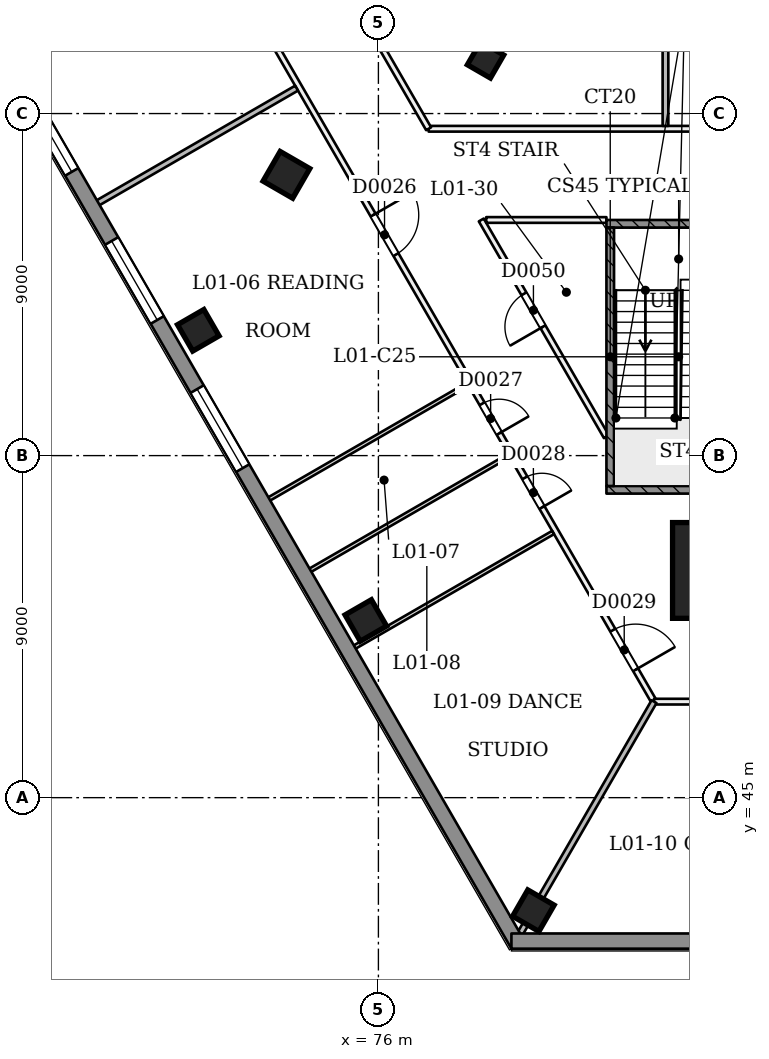
"""IFC4 building model, lengths in metres.
Left out: names, types, materials, properties, quantities, classifications, styles, units other than length and angle.
Written with IfcOpenShell. Run it as: python <this file> out.ifc"""

import sys

from ifc_helpers import new_model, si_unit, direction, frame, frame_2d, origin, origin_2d, place, context, subcontext, project, spatial, rectangle, extrude, element, fill, save


model = new_model("IFC4")
c1 = context("Model", 3, precision=1e-05, world=origin(), true_north=direction((0.0, 1.0)))
c2 = subcontext(c1, "Body", "Model", "MODEL_VIEW")
j1 = project(units=[si_unit("LENGTHUNIT", "METRE"), si_unit("PLANEANGLEUNIT", "RADIAN")], contexts=[c1])
p1 = place(None, origin())
s1 = spatial("IfcSite", under=j1, at=p1, CompositionType="ELEMENT")
p2 = place(p1, origin())
s2 = spatial("IfcBuilding", under=s1, at=p2, CompositionType="ELEMENT")
p3 = place(p2, frame((0.0, 0.0, 9.0)))
s3 = spatial("IfcBuildingStorey", under=s2, at=p3, CompositionType="ELEMENT", Elevation=9.0)
p4 = place(p3, frame((78.792, 64.365, -0.021), z_axis=(0.02216777731, 0.038481960612, 0.999013377466), x_axis=(-0.865113540396, -0.500099350468, 0.03846039371)))
e1 = element("IfcColumn", 1, at=p4, inside=s3, PredefinedType="COLUMN", context=c2, shape_type="SweptSolid", body=[
    extrude(rectangle(XDim=0.7, YDim=0.7, at=origin_2d()), origin(), (0.0, 0.0, 1.0), 4.504),
])
p5 = place(p3, frame((85.0, 50.908, 0.0), z_axis=(0.0, 0.058331497301, 0.998297268564), x_axis=(-1.0, 0.0, 0.0)))
e2 = element("IfcColumn", 2, at=p5, inside=s3, PredefinedType="COLUMN", context=c2, shape_type="SweptSolid", body=[
    extrude(rectangle(XDim=2.52, YDim=2.52, at=origin_2d()), origin(), (0.0, 0.0, 1.0), 4.508),
])
p6 = place(p3, frame((73.553, 61.34, -0.027), z_axis=(0.022167823514, 0.038427840761, 0.999015459668), x_axis=(-0.865419259621, -0.49957324129, 0.038419808228)))
e3 = element("IfcColumn", 3, at=p6, inside=s3, PredefinedType="COLUMN", context=c2, shape_type="SweptSolid", body=[
    extrude(rectangle(XDim=0.9, YDim=0.9, at=origin_2d()), origin(), (0.0, 0.0, 1.0), 4.504),
])
for number, where, z_axis, x_axis in (
    (4, (71.261, 57.297, 0.0), (0.0, 0.0, 1.0), (0.866, 0.5, 0.0)),
    (5, (75.669, 49.662, 0.0), (0.0, 0.0, 1.0), (0.866, 0.5, 0.0)),
    (6, (80.077, 42.026, 0.0), (0.0, 0.0, 1.0), (0.5, 0.866, 0.0)),
):
    element("IfcColumn", number, at=place(p3, frame(where, z_axis=z_axis, x_axis=x_axis)), inside=s3, PredefinedType="COLUMN", context=c2, shape_type="SweptSolid", body=[
        extrude(rectangle(XDim=0.8, YDim=0.8, at=origin_2d()), origin(), (0.0, 0.0, 1.0), 4.5),
    ])
p7 = place(p3, frame((55.57, 95.474, 0.0), z_axis=(0.0, 0.0, 1.0), x_axis=(0.500000085768, -0.866025354266, 0.0)))
e7 = element("IfcWall", 7, at=p7, inside=s3, PredefinedType="PARTITIONING", context=c2, shape_type="SweptSolid", body=[
    extrude(rectangle(XDim=55.365, YDim=0.15, at=frame_2d((27.682, 0.0))), origin(), (0.0, 0.0, 1.0), 4.05),
])
p8 = place(p7, frame((6.832, 0.0, 0.0)))
e8 = element("IfcOpeningElement", 8, at=p8, cuts=e7, PredefinedType="OPENING", context=c2, shape_type="SweptSolid", body=[
    extrude(rectangle(XDim=1.2, YDim=2.1, at=frame_2d((0.6, 1.05))), frame((0.0, 0.085, 0.0), z_axis=(0.0, -1.0, 0.0), x_axis=(1.0, 0.0, 0.0)), (0.0, 0.0, 1.0), 0.171),
])
p9 = place(p7, frame((18.182, 0.0, 0.0)))
e9 = element("IfcOpeningElement", 9, at=p9, cuts=e7, PredefinedType="OPENING", context=c2, shape_type="SweptSolid", body=[
    extrude(rectangle(XDim=1.0, YDim=2.1, at=frame_2d((0.5, 1.05))), frame((0.0, 0.085, 0.0), z_axis=(0.0, -1.0, 0.0), x_axis=(1.0, 0.0, 0.0)), (0.0, 0.0, 1.0), 0.171),
])
p10 = place(p7, frame((30.132, 0.0, 0.0)))
e10 = element("IfcOpeningElement", 10, at=p10, cuts=e7, PredefinedType="OPENING", context=c2, shape_type="SweptSolid", body=[
    extrude(rectangle(XDim=1.2, YDim=2.1, at=frame_2d((0.6, 1.05))), frame((0.0, 0.085, 0.0), z_axis=(0.0, -1.0, 0.0), x_axis=(1.0, 0.0, 0.0)), (0.0, 0.0, 1.0), 0.171),
])
p11 = place(p7, frame((40.582, 0.0, 0.0)))
e11 = element("IfcOpeningElement", 11, at=p11, cuts=e7, PredefinedType="OPENING", context=c2, shape_type="SweptSolid", body=[
    extrude(rectangle(XDim=1.2, YDim=2.1, at=frame_2d((0.6, 1.05))), frame((0.0, 0.085, 0.0), z_axis=(0.0, -1.0, 0.0), x_axis=(1.0, 0.0, 0.0)), (0.0, 0.0, 1.0), 0.171),
])
p12 = place(p7, frame((46.315, 0.0, 0.0)))
e12 = element("IfcOpeningElement", 12, at=p12, cuts=e7, PredefinedType="OPENING", context=c2, shape_type="SweptSolid", body=[
    extrude(rectangle(XDim=0.9, YDim=2.1, at=frame_2d((0.45, 1.05))), frame((0.0, 0.085, 0.0), z_axis=(0.0, -1.0, 0.0), x_axis=(1.0, 0.0, 0.0)), (0.0, 0.0, 1.0), 0.171),
])
p13 = place(p7, frame((48.565, 0.0, 0.0)))
e13 = element("IfcOpeningElement", 13, at=p13, cuts=e7, PredefinedType="OPENING", context=c2, shape_type="SweptSolid", body=[
    extrude(rectangle(XDim=0.9, YDim=2.1, at=frame_2d((0.45, 1.05))), frame((0.0, 0.085, 0.0), z_axis=(0.0, -1.0, 0.0), x_axis=(1.0, 0.0, 0.0)), (0.0, 0.0, 1.0), 0.171),
])
p14 = place(p7, frame((53.195, 0.0, 0.0)))
e14 = element("IfcOpeningElement", 14, at=p14, cuts=e7, PredefinedType="OPENING", context=c2, shape_type="SweptSolid", body=[
    extrude(rectangle(XDim=1.2, YDim=2.1, at=frame_2d((0.6, 1.05))), frame((0.0, 0.085, 0.0), z_axis=(0.0, -1.0, 0.0), x_axis=(1.0, 0.0, 0.0)), (0.0, 0.0, 1.0), 0.171),
])
p15 = place(p3, frame((83.253, 47.526, 0.0), z_axis=(0.0, 0.0, 1.0), x_axis=(1.0, 0.0, 0.0)))
e15 = element("IfcWall", 15, at=p15, inside=s3, PredefinedType="PARTITIONING", context=c2, shape_type="SweptSolid", body=[
    extrude(rectangle(XDim=3.495, YDim=0.15, at=frame_2d((1.747, 0.0))), origin(), (0.0, 0.0, 1.0), 4.05),
])
p16 = place(p15, frame((1.147, 0.0, 0.0)))
e16 = element("IfcOpeningElement", 16, at=p16, cuts=e15, PredefinedType="OPENING", context=c2, shape_type="SweptSolid", body=[
    extrude(rectangle(XDim=1.2, YDim=2.1, at=frame_2d((0.6, 1.05))), frame((0.0, 0.085, 0.0), z_axis=(0.0, -1.0, 0.0), x_axis=(1.0, 0.0, 0.0)), (0.0, 0.0, 1.0), 0.171),
])
p17 = place(p3, frame((92.679, 62.6, 0.0), z_axis=(0.0, 0.0, 1.0), x_axis=(-1.0, 0.0, 0.0)))
e17 = element("IfcWall", 17, at=p17, inside=s3, PredefinedType="PARTITIONING", context=c2, shape_type="SweptSolid", body=[
    extrude(rectangle(XDim=15.357, YDim=0.15, at=frame_2d((7.679, 0.0))), origin(), (0.0, 0.0, 1.0), 4.05),
])
p18 = place(p3, frame((77.321, 62.6, 0.0), z_axis=(0.0, 0.0, 1.0), x_axis=(-0.500000743568, 0.866024974485, 0.0)))
e18 = element("IfcWall", 18, at=p18, inside=s3, PredefinedType="PARTITIONING", context=c2, shape_type="SweptSolid", body=[
    extrude(rectangle(XDim=31.87, YDim=0.15, at=frame_2d((15.935, 0.0))), origin(), (0.0, 0.0, 1.0), 4.05),
])
p19 = place(p18, frame((19.989, 0.0, 0.0)))
e19 = element("IfcOpeningElement", 19, at=p19, cuts=e18, PredefinedType="OPENING", context=c2, shape_type="SweptSolid", body=[
    extrude(rectangle(XDim=1.2, YDim=2.1, at=frame_2d((0.6, 1.05))), frame((0.0, 0.085, 0.0), z_axis=(0.0, -1.0, 0.0), x_axis=(1.0, 0.0, 0.0)), (0.0, 0.0, 1.0), 0.171),
])
p20 = place(p18, frame((5.035, 0.0, 0.0)))
e20 = element("IfcOpeningElement", 20, at=p20, cuts=e18, PredefinedType="OPENING", context=c2, shape_type="SweptSolid", body=[
    extrude(rectangle(XDim=1.2, YDim=2.1, at=frame_2d((0.6, 1.05))), frame((0.0, 0.085, 0.0), z_axis=(0.0, -1.0, 0.0), x_axis=(1.0, 0.0, 0.0)), (0.0, 0.0, 1.0), 0.171),
])
p21 = place(p3, frame((82.0, 54.496, 0.0), z_axis=(0.0, 0.0, 1.0), x_axis=(-0.500010165703, 0.866019534533, 0.0)))
e21 = element("IfcWall", 21, at=p21, inside=s3, PredefinedType="PARTITIONING", context=c2, shape_type="SweptSolid", body=[
    extrude(rectangle(XDim=6.586, YDim=0.15, at=frame_2d((3.293, 0.0))), origin(), (0.0, 0.0, 1.0), 4.05),
])
p22 = place(p21, frame((3.342, 0.0, 0.0)))
e22 = element("IfcOpeningElement", 22, at=p22, cuts=e21, PredefinedType="OPENING", context=c2, shape_type="SweptSolid", body=[
    extrude(rectangle(XDim=1.0, YDim=2.1, at=frame_2d((0.5, 1.05))), frame((0.0, 0.085, 0.0), z_axis=(0.0, -1.0, 0.0), x_axis=(1.0, 0.0, 0.0)), (0.0, 0.0, 1.0), 0.171),
])
p23 = place(p3, frame((78.837, 60.2, 0.0), z_axis=(0.0, 0.0, 1.0), x_axis=(0.999999952341, -0.00030873725, 0.0)))
e23 = element("IfcWall", 23, at=p23, inside=s3, PredefinedType="PARTITIONING", context=c2, shape_type="SweptSolid", body=[
    extrude(rectangle(XDim=3.163, YDim=0.15, at=frame_2d((1.582, 0.0))), origin(), (0.0, 0.0, 1.0), 4.05),
])
p24 = place(p3, frame((68.369, 60.506, 0.0), z_axis=(0.0, 0.0, 1.0), x_axis=(0.866042250622, 0.499970819286, 0.0)))
e24 = element("IfcWall", 24, at=p24, inside=s3, PredefinedType="PARTITIONING", context=c2, shape_type="SweptSolid", body=[
    extrude(rectangle(XDim=6.325, YDim=0.15, at=frame_2d((3.163, 0.0))), origin(), (0.0, 0.0, 1.0), 4.05),
])
p25 = place(p3, frame((72.869, 52.711, 0.0), z_axis=(0.0, 0.0, 1.0), x_axis=(0.866025537322, 0.499999768706, 0.0)))
e25 = element("IfcWall", 25, at=p25, inside=s3, PredefinedType="PARTITIONING", context=c2, shape_type="SweptSolid", body=[
    extrude(rectangle(XDim=6.325, YDim=0.1, at=frame_2d((3.163, 0.0))), origin(), (0.0, 0.0, 1.0), 4.05),
])
p26 = place(p3, frame((73.952, 50.836, 0.0), z_axis=(0.0, 0.0, 1.0), x_axis=(0.866015887322, 0.500016482634, 0.0)))
e26 = element("IfcWall", 26, at=p26, inside=s3, PredefinedType="PARTITIONING", context=c2, shape_type="SweptSolid", body=[
    extrude(rectangle(XDim=6.325, YDim=0.1, at=frame_2d((3.163, 0.0))), origin(), (0.0, 0.0, 1.0), 4.05),
])
p27 = place(p3, frame((75.119, 48.814, 0.0), z_axis=(0.0, 0.0, 1.0), x_axis=(0.866025537322, 0.499999768706, 0.0)))
e27 = element("IfcWall", 27, at=p27, inside=s3, PredefinedType="PARTITIONING", context=c2, shape_type="SweptSolid", body=[
    extrude(rectangle(XDim=6.325, YDim=0.1, at=frame_2d((3.163, 0.0))), origin(), (0.0, 0.0, 1.0), 4.05),
])
p28 = place(p3, frame((79.558, 41.126, 0.0), z_axis=(0.0, 0.0, 1.0), x_axis=(0.499969342782, 0.866043103014, 0.0)))
e28 = element("IfcWall", 28, at=p28, inside=s3, PredefinedType="PARTITIONING", context=c2, shape_type="SweptSolid", body=[
    extrude(rectangle(XDim=7.39, YDim=0.15, at=frame_2d((3.695, 0.0))), origin(), (0.0, 0.0, 1.0), 4.05),
])
p29 = place(p3, frame((83.553, 83.4, 0.0), z_axis=(0.0, 0.0, 1.0), x_axis=(0.0, -1.0, 0.0)))
e29 = element("IfcWall", 29, at=p29, inside=s3, PredefinedType="PARTITIONING", context=c2, shape_type="SweptSolid", body=[
    extrude(rectangle(XDim=20.725, YDim=0.15, at=frame_2d((10.362, 0.0))), origin(), (0.0, 0.0, 1.0), 4.05),
])
p30 = place(p3, frame((79.673, 41.126, 0.0), z_axis=(0.0, 0.0, 1.0), x_axis=(-0.499997306052, 0.866026959131, 0.0)))
e30 = element("IfcWall", 30, at=p30, inside=s3, PredefinedType="SOLIDWALL", context=c2, shape_type="SweptSolid", body=[
    extrude(rectangle(XDim=62.87, YDim=0.4, at=frame_2d((31.435, 0.0))), origin(), (0.0, 0.0, 1.0), 4.05),
])
p31 = place(p30, frame((54.986, 0.0, 0.9)))
e31 = element("IfcOpeningElement", 31, at=p31, cuts=e30, PredefinedType="OPENING", context=c2, shape_type="SweptSolid", body=[
    extrude(rectangle(XDim=2.4, YDim=1.5, at=frame_2d((1.2, 0.75))), frame((0.0, 0.21, 0.0), z_axis=(0.0, -1.0, 0.0), x_axis=(1.0, 0.0, 0.0)), (0.0, 0.0, 1.0), 0.421),
])
p32 = place(p30, frame((50.486, 0.0, 0.9)))
e32 = element("IfcOpeningElement", 32, at=p32, cuts=e30, PredefinedType="OPENING", context=c2, shape_type="SweptSolid", body=[
    extrude(rectangle(XDim=2.4, YDim=1.5, at=frame_2d((1.2, 0.75))), frame((0.0, 0.21, 0.0), z_axis=(0.0, -1.0, 0.0), x_axis=(1.0, 0.0, 0.0)), (0.0, 0.0, 1.0), 0.421),
])
p33 = place(p30, frame((45.986, 0.0, 0.9)))
e33 = element("IfcOpeningElement", 33, at=p33, cuts=e30, PredefinedType="OPENING", context=c2, shape_type="SweptSolid", body=[
    extrude(rectangle(XDim=2.4, YDim=1.5, at=frame_2d((1.2, 0.75))), frame((0.0, 0.21, 0.0), z_axis=(0.0, -1.0, 0.0), x_axis=(1.0, 0.0, 0.0)), (0.0, 0.0, 1.0), 0.421),
])
p34 = place(p30, frame((32.486, 0.0, 0.9)))
e34 = element("IfcOpeningElement", 34, at=p34, cuts=e30, PredefinedType="OPENING", context=c2, shape_type="SweptSolid", body=[
    extrude(rectangle(XDim=2.4, YDim=1.5, at=frame_2d((1.2, 0.75))), frame((0.0, 0.21, 0.0), z_axis=(0.0, -1.0, 0.0), x_axis=(1.0, 0.0, 0.0)), (0.0, 0.0, 1.0), 0.421),
])
p35 = place(p30, frame((27.986, 0.0, 0.9)))
e35 = element("IfcOpeningElement", 35, at=p35, cuts=e30, PredefinedType="OPENING", context=c2, shape_type="SweptSolid", body=[
    extrude(rectangle(XDim=2.4, YDim=1.5, at=frame_2d((1.2, 0.75))), frame((0.0, 0.21, 0.0), z_axis=(0.0, -1.0, 0.0), x_axis=(1.0, 0.0, 0.0)), (0.0, 0.0, 1.0), 0.421),
])
p36 = place(p30, frame((23.486, 0.0, 0.9)))
e36 = element("IfcOpeningElement", 36, at=p36, cuts=e30, PredefinedType="OPENING", context=c2, shape_type="SweptSolid", body=[
    extrude(rectangle(XDim=2.4, YDim=1.5, at=frame_2d((1.2, 0.75))), frame((0.0, 0.21, 0.0), z_axis=(0.0, -1.0, 0.0), x_axis=(1.0, 0.0, 0.0)), (0.0, 0.0, 1.0), 0.421),
])
p37 = place(p30, frame((18.986, 0.0, 0.9)))
e37 = element("IfcOpeningElement", 37, at=p37, cuts=e30, PredefinedType="OPENING", context=c2, shape_type="SweptSolid", body=[
    extrude(rectangle(XDim=2.4, YDim=1.5, at=frame_2d((1.2, 0.75))), frame((0.0, 0.21, 0.0), z_axis=(0.0, -1.0, 0.0), x_axis=(1.0, 0.0, 0.0)), (0.0, 0.0, 1.0), 0.421),
])
p38 = place(p30, frame((14.486, 0.0, 0.9)))
e38 = element("IfcOpeningElement", 38, at=p38, cuts=e30, PredefinedType="OPENING", context=c2, shape_type="SweptSolid", body=[
    extrude(rectangle(XDim=2.4, YDim=1.5, at=frame_2d((1.2, 0.75))), frame((0.0, 0.21, 0.0), z_axis=(0.0, -1.0, 0.0), x_axis=(1.0, 0.0, 0.0)), (0.0, 0.0, 1.0), 0.421),
])
p39 = place(p3, frame((90.5, 41.226, 0.0), z_axis=(0.0, 0.0, 1.0), x_axis=(-1.0, 0.0, 0.0)))
e39 = element("IfcWall", 39, at=p39, inside=s3, PredefinedType="SOLIDWALL", context=c2, shape_type="SweptSolid", body=[
    extrude(rectangle(XDim=11.0, YDim=0.4, at=frame_2d((5.5, 0.0))), origin(), (0.0, 0.0, 1.0), 4.05),
])
p40 = place(p3, frame((82.0, 60.1, 0.0), z_axis=(0.0, 0.0, 1.0), x_axis=(1.0, 0.0, 0.0)))
e40 = element("IfcWall", 40, at=p40, inside=s3, PredefinedType="SOLIDWALL", context=c2, shape_type="SweptSolid", body=[
    extrude(rectangle(XDim=6.0, YDim=0.2, at=frame_2d((3.0, 0.0))), origin(), (0.0, 0.0, 1.0), 4.05),
])
p41 = place(p40, frame((4.1, 0.0, 0.0)))
e41 = element("IfcOpeningElement", 41, at=p41, cuts=e40, PredefinedType="OPENING", context=c2, shape_type="SweptSolid", body=[
    extrude(rectangle(XDim=1.4, YDim=2.1, at=frame_2d((0.7, 1.05))), frame((0.0, 0.11, 0.0), z_axis=(0.0, -1.0, 0.0), x_axis=(1.0, 0.0, 0.0)), (0.0, 0.0, 1.0), 0.221),
])
p42 = place(p3, frame((82.0, 53.1, 0.0), z_axis=(0.0, 0.0, 1.0), x_axis=(1.0, 0.0, 0.0)))
e42 = element("IfcWall", 42, at=p42, inside=s3, PredefinedType="SOLIDWALL", context=c2, shape_type="SweptSolid", body=[
    extrude(rectangle(XDim=6.0, YDim=0.2, at=frame_2d((3.0, 0.0))), origin(), (0.0, 0.0, 1.0), 4.05),
])
p43 = place(p3, frame((82.1, 53.2, 0.0), z_axis=(0.0, 0.0, 1.0), x_axis=(0.0, 1.0, 0.0)))
e43 = element("IfcWall", 43, at=p43, inside=s3, PredefinedType="SOLIDWALL", context=c2, shape_type="SweptSolid", body=[
    extrude(rectangle(XDim=6.8, YDim=0.2, at=frame_2d((3.4, 0.0))), origin(), (0.0, 0.0, 1.0), 4.05),
])
p44 = place(p11, origin())
e44 = element("IfcDoor", 44, at=p44, inside=s3, OperationType="SINGLE_SWING_LEFT", PredefinedType="NOTDEFINED", context=c2, shape_type="SweptSolid", body=[
    extrude(rectangle(XDim=1.2, YDim=2.1, at=frame_2d((0.6, 1.05))), frame((0.0, 0.025, 0.0), z_axis=(0.0, -1.0, 0.0), x_axis=(1.0, 0.0, 0.0)), (0.0, 0.0, 1.0), 0.05),
])
fill(e11, e44)
p45 = place(p12, origin())
e45 = element("IfcDoor", 45, at=p45, inside=s3, OperationType="SINGLE_SWING_RIGHT", PredefinedType="NOTDEFINED", context=c2, shape_type="SweptSolid", body=[
    extrude(rectangle(XDim=0.9, YDim=2.1, at=frame_2d((0.45, 1.05))), frame((0.0, 0.025, 0.0), z_axis=(0.0, -1.0, 0.0), x_axis=(1.0, 0.0, 0.0)), (0.0, 0.0, 1.0), 0.05),
])
fill(e12, e45)
p46 = place(p13, origin())
e46 = element("IfcDoor", 46, at=p46, inside=s3, OperationType="SINGLE_SWING_RIGHT", PredefinedType="NOTDEFINED", context=c2, shape_type="SweptSolid", body=[
    extrude(rectangle(XDim=0.9, YDim=2.1, at=frame_2d((0.45, 1.05))), frame((0.0, 0.025, 0.0), z_axis=(0.0, -1.0, 0.0), x_axis=(1.0, 0.0, 0.0)), (0.0, 0.0, 1.0), 0.05),
])
fill(e13, e46)
p47 = place(p14, origin())
e47 = element("IfcDoor", 47, at=p47, inside=s3, OperationType="SINGLE_SWING_RIGHT", PredefinedType="NOTDEFINED", context=c2, shape_type="SweptSolid", body=[
    extrude(rectangle(XDim=1.2, YDim=2.1, at=frame_2d((0.6, 1.05))), frame((0.0, 0.025, 0.0), z_axis=(0.0, -1.0, 0.0), x_axis=(1.0, 0.0, 0.0)), (0.0, 0.0, 1.0), 0.05),
])
fill(e14, e47)
p48 = place(p22, origin())
e48 = element("IfcDoor", 48, at=p48, inside=s3, OperationType="SINGLE_SWING_LEFT", PredefinedType="NOTDEFINED", context=c2, shape_type="SweptSolid", body=[
    extrude(rectangle(XDim=1.0, YDim=2.1, at=frame_2d((0.5, 1.05))), frame((0.0, 0.025, 0.0), z_axis=(0.0, -1.0, 0.0), x_axis=(1.0, 0.0, 0.0)), (0.0, 0.0, 1.0), 0.05),
])
fill(e22, e48)
p49 = place(p36, origin())
e49 = element("IfcWindow", 49, at=p49, inside=s3, PartitioningType="SINGLE_PANEL", PredefinedType="WINDOW", context=c2, shape_type="SweptSolid", body=[
    extrude(rectangle(XDim=2.4, YDim=1.5, at=frame_2d((1.2, 0.75))), frame((0.0, 0.03, 0.0), z_axis=(0.0, -1.0, 0.0), x_axis=(1.0, 0.0, 0.0)), (0.0, 0.0, 1.0), 0.06),
])
fill(e36, e49)
p50 = place(p37, origin())
e50 = element("IfcWindow", 50, at=p50, inside=s3, PartitioningType="SINGLE_PANEL", PredefinedType="WINDOW", context=c2, shape_type="SweptSolid", body=[
    extrude(rectangle(XDim=2.4, YDim=1.5, at=frame_2d((1.2, 0.75))), frame((0.0, 0.03, 0.0), z_axis=(0.0, -1.0, 0.0), x_axis=(1.0, 0.0, 0.0)), (0.0, 0.0, 1.0), 0.06),
])
fill(e37, e50)
p51 = place(p38, origin())
e51 = element("IfcWindow", 51, at=p51, inside=s3, PartitioningType="SINGLE_PANEL", PredefinedType="WINDOW", context=c2, shape_type="SweptSolid", body=[
    extrude(rectangle(XDim=2.4, YDim=1.5, at=frame_2d((1.2, 0.75))), frame((0.0, 0.03, 0.0), z_axis=(0.0, -1.0, 0.0), x_axis=(1.0, 0.0, 0.0)), (0.0, 0.0, 1.0), 0.06),
])
fill(e38, e51)
save(model, sys.argv[1])
